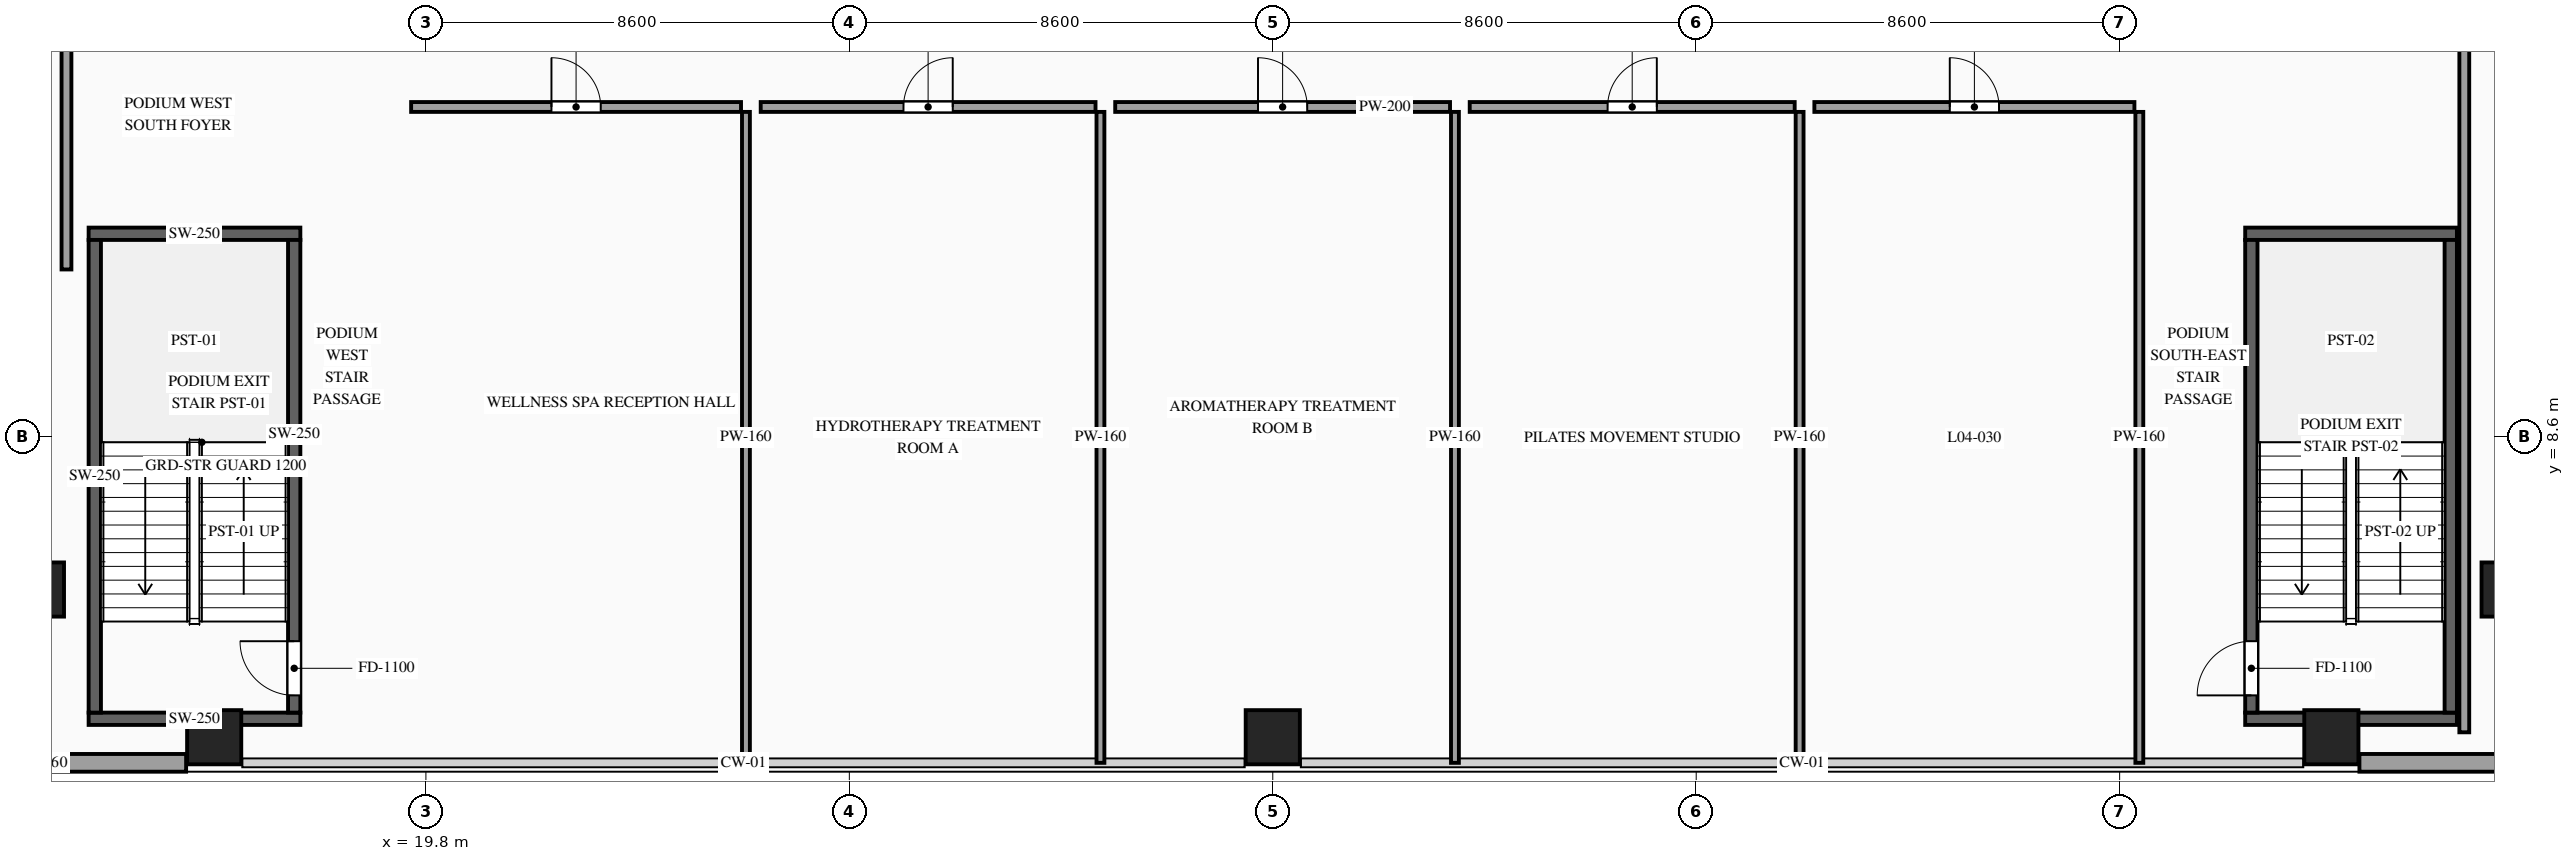
"""IFC4 building model, lengths in metres.
Left out: names, types, materials, properties, quantities, classifications, styles, units other than length and angle.
Written with IfcOpenShell. Run it as: python <this file> out.ifc"""

import sys

from ifc_helpers import new_model, si_unit, direction, frame, frame_2d, origin, origin_2d, place, context, subcontext, project, spatial, rectangle, extrude, source, transform, mapped, element, fill, save


model = new_model("IFC4")
c1 = context("Model", 3, precision=1e-05, world=origin(), true_north=direction((0.0, 1.0)))
c2 = subcontext(c1, "Body", "Model", "MODEL_VIEW")
j1 = project(units=[si_unit("LENGTHUNIT", "METRE"), si_unit("PLANEANGLEUNIT", "RADIAN")], contexts=[c1])
p1 = place(None, origin())
s1 = spatial("IfcSite", under=j1, at=p1, CompositionType="ELEMENT")
p2 = place(p1, origin())
s2 = spatial("IfcBuilding", under=s1, at=p2, CompositionType="ELEMENT")
p3 = place(p2, frame((0.0, 0.0, 15.0)))
s3 = spatial("IfcBuildingStorey", under=s2, at=p3, CompositionType="ELEMENT", Elevation=15.0)
m1 = source(origin(), c2, "Body", "SweptSolid", [
    extrude(rectangle(XDim=1.1, YDim=1.1, at=origin_2d()), origin(), (0.0, 0.0, 1.0), 4.8),
])
for number, where, z_axis, x_axis in (
    (1, (11.9, 5.5, 0.0), (0.0, 0.0, 1.0), (1.0, 0.0, 0.0)),
    (2, (62.1, 5.5, 0.0), (0.0, 0.0, 1.0), (1.0, 0.0, 0.0)),
    (3, (15.5, 2.5, 0.0), (0.0, 0.0, 1.0), (1.0, 0.0, 0.0)),
    (4, (37.0, 2.5, 0.0), (0.0, 0.0, 1.0), (1.0, 0.0, 0.0)),
    (5, (58.5, 2.5, 0.0), (0.0, 0.0, 1.0), (1.0, 0.0, 0.0)),
):
    element("IfcColumn", number, at=place(p3, frame(where, z_axis=z_axis, x_axis=x_axis)), inside=s3, PredefinedType="COLUMN", context=c2, shape_type="MappedRepresentation", body=[
        mapped(m1, transform((0.0, 0.0, 0.0), scale=1.0)),
    ])
p4 = place(p3, frame((2.0, 1.98, 0.0), z_axis=(0.0, 0.0, 1.0), x_axis=(1.0, 0.0, 0.0)))
e6 = element("IfcWall", 6, at=p4, inside=s3, PredefinedType="SOLIDWALL", context=c2, shape_type="SweptSolid", body=[
    extrude(rectangle(XDim=12.93, YDim=0.36, at=frame_2d((6.465, 0.0))), origin(), (0.0, 0.0, 1.0), 4.52),
])
p5 = place(p4, frame((4.4, 0.0, 0.85)))
e7 = element("IfcOpeningElement", 7, at=p5, cuts=e6, PredefinedType="OPENING", context=c2, shape_type="SweptSolid", body=[
    extrude(rectangle(XDim=2.4, YDim=2.4, at=frame_2d((1.2, 1.2))), frame((0.0, 0.195, 0.0), z_axis=(0.0, -1.0, 0.0), x_axis=(1.0, 0.0, 0.0)), (0.0, 0.0, 1.0), 0.39),
])
p6 = place(p3, frame((59.07, 1.98, 0.0), z_axis=(0.0, 0.0, 1.0), x_axis=(1.0, 0.0, 0.0)))
e8 = element("IfcWall", 8, at=p6, inside=s3, PredefinedType="SOLIDWALL", context=c2, shape_type="SweptSolid", body=[
    extrude(rectangle(XDim=12.93, YDim=0.36, at=frame_2d((6.465, 0.0))), origin(), (0.0, 0.0, 1.0), 4.52),
])
p7 = place(p6, frame((5.73, 0.0, 0.85)))
e9 = element("IfcOpeningElement", 9, at=p7, cuts=e8, PredefinedType="OPENING", context=c2, shape_type="SweptSolid", body=[
    extrude(rectangle(XDim=2.4, YDim=2.4, at=frame_2d((1.2, 1.2))), frame((0.0, 0.195, 0.0), z_axis=(0.0, -1.0, 0.0), x_axis=(1.0, 0.0, 0.0)), (0.0, 0.0, 1.0), 0.39),
])
m2 = source(origin(), c2, "Body", "SweptSolid", [
    extrude(rectangle(XDim=4.3, YDim=0.25, at=frame_2d((2.15, 0.0))), origin(), (0.0, 0.0, 1.0), 4.52),
])
for number, where, z_axis, x_axis in (
    (10, (12.95, 2.875, 0.0), (0.0, 0.0, 1.0), (1.0, 0.0, 0.0)),
    (11, (12.95, 12.725, 0.0), (0.0, 0.0, 1.0), (1.0, 0.0, 0.0)),
):
    element("IfcWall", number, at=place(p3, frame(where, z_axis=z_axis, x_axis=x_axis)), inside=s3, PredefinedType="SOLIDWALL", context=c2, shape_type="MappedRepresentation", body=[
        mapped(m2, transform((0.0, 0.0, 0.0), scale=1.0)),
    ])
m3 = source(origin(), c2, "Body", "SweptSolid", [
    extrude(rectangle(XDim=9.6, YDim=0.25, at=frame_2d((4.8, 0.0))), origin(), (0.0, 0.0, 1.0), 4.52),
])
p8 = place(p3, frame((13.075, 3.0, 0.0), z_axis=(0.0, 0.0, 1.0), x_axis=(0.0, 1.0, 0.0)))
e12 = element("IfcWall", 12, at=p8, inside=s3, PredefinedType="SOLIDWALL", context=c2, shape_type="MappedRepresentation", body=[
    mapped(m3, transform((0.0, 0.0, 0.0), scale=1.0)),
])
p9 = place(p3, frame((17.125, 3.0, 0.0), z_axis=(0.0, 0.0, 1.0), x_axis=(0.0, 1.0, 0.0)))
e13 = element("IfcWall", 13, at=p9, inside=s3, PredefinedType="SOLIDWALL", context=c2, shape_type="SweptSolid", body=[
    extrude(rectangle(XDim=9.6, YDim=0.25, at=frame_2d((4.8, 0.0))), origin(), (0.0, 0.0, 1.0), 4.52),
])
p10 = place(p9, frame((0.35, 0.0, 0.0)))
e14 = element("IfcOpeningElement", 14, at=p10, cuts=e13, PredefinedType="OPENING", context=c2, shape_type="SweptSolid", body=[
    extrude(rectangle(XDim=1.1, YDim=2.2, at=frame_2d((0.55, 1.1))), frame((0.0, 0.14, 0.0), z_axis=(0.0, -1.0, 0.0), x_axis=(1.0, 0.0, 0.0)), (0.0, 0.0, 1.0), 0.28),
])
for number, where, z_axis, x_axis in (
    (15, (56.75, 2.875, 0.0), (0.0, 0.0, 1.0), (1.0, 0.0, 0.0)),
    (16, (56.75, 12.725, 0.0), (0.0, 0.0, 1.0), (1.0, 0.0, 0.0)),
):
    element("IfcWall", number, at=place(p3, frame(where, z_axis=z_axis, x_axis=x_axis)), inside=s3, PredefinedType="SOLIDWALL", context=c2, shape_type="MappedRepresentation", body=[
        mapped(m2, transform((0.0, 0.0, 0.0), scale=1.0)),
    ])
p11 = place(p3, frame((56.875, 3.0, 0.0), z_axis=(0.0, 0.0, 1.0), x_axis=(0.0, 1.0, 0.0)))
e17 = element("IfcWall", 17, at=p11, inside=s3, PredefinedType="SOLIDWALL", context=c2, shape_type="SweptSolid", body=[
    extrude(rectangle(XDim=9.6, YDim=0.25, at=frame_2d((4.8, 0.0))), origin(), (0.0, 0.0, 1.0), 4.52),
])
p12 = place(p11, frame((0.35, 0.0, 0.0)))
e18 = element("IfcOpeningElement", 18, at=p12, cuts=e17, PredefinedType="OPENING", context=c2, shape_type="SweptSolid", body=[
    extrude(rectangle(XDim=1.1, YDim=2.2, at=frame_2d((0.55, 1.1))), frame((0.0, 0.14, 0.0), z_axis=(0.0, -1.0, 0.0), x_axis=(1.0, 0.0, 0.0)), (0.0, 0.0, 1.0), 0.28),
])
p13 = place(p3, frame((60.925, 3.0, 0.0), z_axis=(0.0, 0.0, 1.0), x_axis=(0.0, 1.0, 0.0)))
e19 = element("IfcWall", 19, at=p13, inside=s3, PredefinedType="SOLIDWALL", context=c2, shape_type="MappedRepresentation", body=[
    mapped(m3, transform((0.0, 0.0, 0.0), scale=1.0)),
])
p14 = place(p3, frame((19.5, 15.3, 0.0), z_axis=(0.0, 0.0, 1.0), x_axis=(1.0, 0.0, 0.0)))
e20 = element("IfcWall", 20, at=p14, inside=s3, PredefinedType="PARTITIONING", context=c2, shape_type="SweptSolid", body=[
    extrude(rectangle(XDim=6.7, YDim=0.2, at=frame_2d((3.35, 0.0))), origin(), (0.0, 0.0, 1.0), 4.52),
])
p15 = place(p14, frame((2.85, 0.0, 0.0)))
e21 = element("IfcOpeningElement", 21, at=p15, cuts=e20, PredefinedType="OPENING", context=c2, shape_type="SweptSolid", body=[
    extrude(rectangle(XDim=1.0, YDim=2.2, at=frame_2d((0.5, 1.1))), frame((0.0, 0.115, 0.0), z_axis=(0.0, -1.0, 0.0), x_axis=(1.0, 0.0, 0.0)), (0.0, 0.0, 1.0), 0.23),
])
m4 = source(origin(), c2, "Body", "SweptSolid", [
    extrude(rectangle(XDim=13.22, YDim=0.16, at=frame_2d((6.61, 0.0))), origin(), (0.0, 0.0, 1.0), 4.52),
])
p16 = place(p3, frame((26.3, 1.98, 0.0), z_axis=(0.0, 0.0, 1.0), x_axis=(0.0, 1.0, 0.0)))
e22 = element("IfcWall", 22, at=p16, inside=s3, PredefinedType="PARTITIONING", context=c2, shape_type="MappedRepresentation", body=[
    mapped(m4, transform((0.0, 0.0, 0.0), scale=1.0)),
])
p17 = place(p3, frame((26.6, 15.3, 0.0), z_axis=(0.0, 0.0, 1.0), x_axis=(1.0, 0.0, 0.0)))
e23 = element("IfcWall", 23, at=p17, inside=s3, PredefinedType="PARTITIONING", context=c2, shape_type="SweptSolid", body=[
    extrude(rectangle(XDim=6.8, YDim=0.2, at=frame_2d((3.4, 0.0))), origin(), (0.0, 0.0, 1.0), 4.52),
])
p18 = place(p17, frame((2.9, 0.0, 0.0)))
e24 = element("IfcOpeningElement", 24, at=p18, cuts=e23, PredefinedType="OPENING", context=c2, shape_type="SweptSolid", body=[
    extrude(rectangle(XDim=1.0, YDim=2.2, at=frame_2d((0.5, 1.1))), frame((0.0, 0.115, 0.0), z_axis=(0.0, -1.0, 0.0), x_axis=(1.0, 0.0, 0.0)), (0.0, 0.0, 1.0), 0.23),
])
p19 = place(p3, frame((33.5, 1.98, 0.0), z_axis=(0.0, 0.0, 1.0), x_axis=(0.0, 1.0, 0.0)))
e25 = element("IfcWall", 25, at=p19, inside=s3, PredefinedType="PARTITIONING", context=c2, shape_type="MappedRepresentation", body=[
    mapped(m4, transform((0.0, 0.0, 0.0), scale=1.0)),
])
p20 = place(p3, frame((33.8, 15.3, 0.0), z_axis=(0.0, 0.0, 1.0), x_axis=(1.0, 0.0, 0.0)))
e26 = element("IfcWall", 26, at=p20, inside=s3, PredefinedType="PARTITIONING", context=c2, shape_type="SweptSolid", body=[
    extrude(rectangle(XDim=6.8, YDim=0.2, at=frame_2d((3.4, 0.0))), origin(), (0.0, 0.0, 1.0), 4.52),
])
p21 = place(p20, frame((2.9, 0.0, 0.0)))
e27 = element("IfcOpeningElement", 27, at=p21, cuts=e26, PredefinedType="OPENING", context=c2, shape_type="SweptSolid", body=[
    extrude(rectangle(XDim=1.0, YDim=2.2, at=frame_2d((0.5, 1.1))), frame((0.0, 0.115, 0.0), z_axis=(0.0, -1.0, 0.0), x_axis=(1.0, 0.0, 0.0)), (0.0, 0.0, 1.0), 0.23),
])
p22 = place(p3, frame((40.7, 1.98, 0.0), z_axis=(0.0, 0.0, 1.0), x_axis=(0.0, 1.0, 0.0)))
e28 = element("IfcWall", 28, at=p22, inside=s3, PredefinedType="PARTITIONING", context=c2, shape_type="MappedRepresentation", body=[
    mapped(m4, transform((0.0, 0.0, 0.0), scale=1.0)),
])
p23 = place(p3, frame((41.0, 15.3, 0.0), z_axis=(0.0, 0.0, 1.0), x_axis=(1.0, 0.0, 0.0)))
e29 = element("IfcWall", 29, at=p23, inside=s3, PredefinedType="PARTITIONING", context=c2, shape_type="SweptSolid", body=[
    extrude(rectangle(XDim=6.6, YDim=0.2, at=frame_2d((3.3, 0.0))), origin(), (0.0, 0.0, 1.0), 4.52),
])
p24 = place(p23, frame((2.8, 0.0, 0.0)))
e30 = element("IfcOpeningElement", 30, at=p24, cuts=e29, PredefinedType="OPENING", context=c2, shape_type="SweptSolid", body=[
    extrude(rectangle(XDim=1.0, YDim=2.2, at=frame_2d((0.5, 1.1))), frame((0.0, 0.115, 0.0), z_axis=(0.0, -1.0, 0.0), x_axis=(1.0, 0.0, 0.0)), (0.0, 0.0, 1.0), 0.23),
])
p25 = place(p3, frame((47.7, 1.98, 0.0), z_axis=(0.0, 0.0, 1.0), x_axis=(0.0, 1.0, 0.0)))
e31 = element("IfcWall", 31, at=p25, inside=s3, PredefinedType="PARTITIONING", context=c2, shape_type="MappedRepresentation", body=[
    mapped(m4, transform((0.0, 0.0, 0.0), scale=1.0)),
])
p26 = place(p3, frame((48.0, 15.3, 0.0), z_axis=(0.0, 0.0, 1.0), x_axis=(1.0, 0.0, 0.0)))
e32 = element("IfcWall", 32, at=p26, inside=s3, PredefinedType="PARTITIONING", context=c2, shape_type="SweptSolid", body=[
    extrude(rectangle(XDim=6.5, YDim=0.2, at=frame_2d((3.25, 0.0))), origin(), (0.0, 0.0, 1.0), 4.52),
])
p27 = place(p26, frame((2.75, 0.0, 0.0)))
e33 = element("IfcOpeningElement", 33, at=p27, cuts=e32, PredefinedType="OPENING", context=c2, shape_type="SweptSolid", body=[
    extrude(rectangle(XDim=1.0, YDim=2.2, at=frame_2d((0.5, 1.1))), frame((0.0, 0.115, 0.0), z_axis=(0.0, -1.0, 0.0), x_axis=(1.0, 0.0, 0.0)), (0.0, 0.0, 1.0), 0.23),
])
p28 = place(p3, frame((54.6, 1.98, 0.0), z_axis=(0.0, 0.0, 1.0), x_axis=(0.0, 1.0, 0.0)))
e34 = element("IfcWall", 34, at=p28, inside=s3, PredefinedType="PARTITIONING", context=c2, shape_type="MappedRepresentation", body=[
    mapped(m4, transform((0.0, 0.0, 0.0), scale=1.0)),
])
p29 = place(p3, frame((12.5, 12.0, 0.0), z_axis=(0.0, 0.0, 1.0), x_axis=(0.0, 1.0, 0.0)))
e35 = element("IfcWall", 35, at=p29, inside=s3, PredefinedType="PARTITIONING", context=c2, shape_type="SweptSolid", body=[
    extrude(rectangle(XDim=12.4, YDim=0.2, at=frame_2d((6.2, 0.0))), origin(), (0.0, 0.0, 1.0), 4.52),
])
p30 = place(p29, frame((5.0, 0.0, 0.0)))
e36 = element("IfcOpeningElement", 36, at=p30, cuts=e35, PredefinedType="OPENING", context=c2, shape_type="SweptSolid", body=[
    extrude(rectangle(XDim=1.0, YDim=2.2, at=frame_2d((0.5, 1.1))), frame((0.0, 0.115, 0.0), z_axis=(0.0, -1.0, 0.0), x_axis=(1.0, 0.0, 0.0)), (0.0, 0.0, 1.0), 0.23),
])
p31 = place(p3, frame((61.2, 2.6, 0.0), z_axis=(0.0, 0.0, 1.0), x_axis=(0.0, 1.0, 0.0)))
e37 = element("IfcWall", 37, at=p31, inside=s3, PredefinedType="PARTITIONING", context=c2, shape_type="SweptSolid", body=[
    extrude(rectangle(XDim=22.4, YDim=0.2, at=frame_2d((11.2, 0.0))), origin(), (0.0, 0.0, 1.0), 4.52),
])
p32 = place(p31, frame((14.9, 0.0, 0.0)))
e38 = element("IfcOpeningElement", 38, at=p32, cuts=e37, PredefinedType="OPENING", context=c2, shape_type="SweptSolid", body=[
    extrude(rectangle(XDim=1.0, YDim=2.2, at=frame_2d((0.5, 1.1))), frame((0.0, 0.115, 0.0), z_axis=(0.0, -1.0, 0.0), x_axis=(1.0, 0.0, 0.0)), (0.0, 0.0, 1.0), 0.23),
])
m5 = source(origin(), c2, "Body", "SweptSolid", [
    extrude(rectangle(XDim=1.1, YDim=2.2, at=frame_2d((0.55, 1.1))), frame((0.0, 0.025, 0.0), z_axis=(0.0, -1.0, 0.0), x_axis=(1.0, 0.0, 0.0)), (0.0, 0.0, 1.0), 0.05),
])
p33 = place(p10, origin())
e39 = element("IfcDoor", 39, at=p33, inside=s3, OperationType="SINGLE_SWING_RIGHT", PredefinedType="DOOR", context=c2, shape_type="MappedRepresentation", body=[
    mapped(m5, transform((0.0, 0.0, 0.0), scale=1.0)),
])
fill(e14, e39)
p34 = place(p12, origin())
e40 = element("IfcDoor", 40, at=p34, inside=s3, OperationType="SINGLE_SWING_LEFT", PredefinedType="DOOR", context=c2, shape_type="MappedRepresentation", body=[
    mapped(m5, transform((0.0, 0.0, 0.0), scale=1.0)),
])
fill(e18, e40)
m6 = source(origin(), c2, "Body", "SweptSolid", [
    extrude(rectangle(XDim=1.0, YDim=2.2, at=frame_2d((0.5, 1.1))), frame((0.0, 0.025, 0.0), z_axis=(0.0, -1.0, 0.0), x_axis=(1.0, 0.0, 0.0)), (0.0, 0.0, 1.0), 0.05),
])
p35 = place(p15, origin())
e41 = element("IfcDoor", 41, at=p35, inside=s3, OperationType="SINGLE_SWING_LEFT", PredefinedType="DOOR", context=c2, shape_type="MappedRepresentation", body=[
    mapped(m6, transform((0.0, 0.0, 0.0), scale=1.0)),
])
fill(e21, e41)
p36 = place(p18, origin())
e42 = element("IfcDoor", 42, at=p36, inside=s3, OperationType="SINGLE_SWING_RIGHT", PredefinedType="DOOR", context=c2, shape_type="MappedRepresentation", body=[
    mapped(m6, transform((0.0, 0.0, 0.0), scale=1.0)),
])
fill(e24, e42)
p37 = place(p21, origin())
e43 = element("IfcDoor", 43, at=p37, inside=s3, OperationType="SINGLE_SWING_LEFT", PredefinedType="DOOR", context=c2, shape_type="MappedRepresentation", body=[
    mapped(m6, transform((0.0, 0.0, 0.0), scale=1.0)),
])
fill(e27, e43)
p38 = place(p24, origin())
e44 = element("IfcDoor", 44, at=p38, inside=s3, OperationType="SINGLE_SWING_RIGHT", PredefinedType="DOOR", context=c2, shape_type="MappedRepresentation", body=[
    mapped(m6, transform((0.0, 0.0, 0.0), scale=1.0)),
])
fill(e30, e44)
p39 = place(p27, origin())
e45 = element("IfcDoor", 45, at=p39, inside=s3, OperationType="SINGLE_SWING_LEFT", PredefinedType="DOOR", context=c2, shape_type="MappedRepresentation", body=[
    mapped(m6, transform((0.0, 0.0, 0.0), scale=1.0)),
])
fill(e33, e45)
save(model, sys.argv[1])
